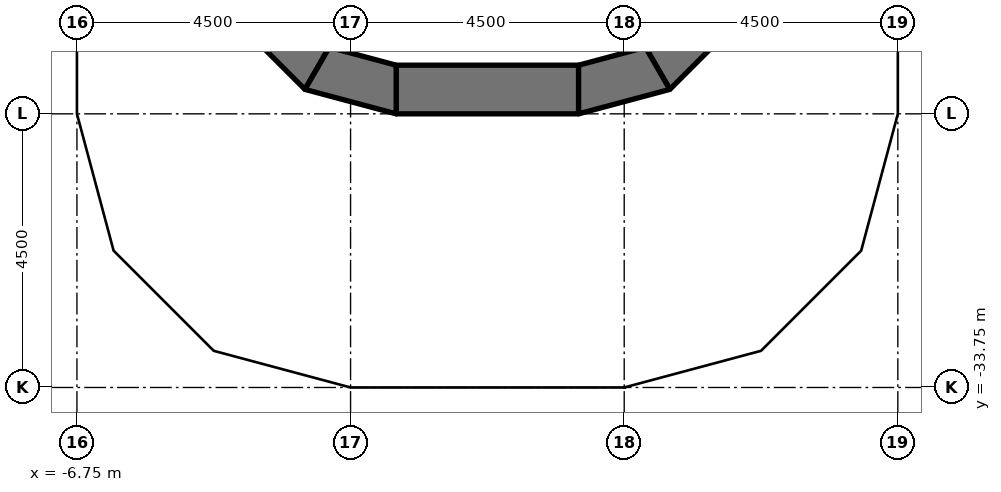
"""IFC4 building model, lengths in metres.
Left out: names, types, materials, properties, quantities, classifications, styles, units other than length and angle.
Written with IfcOpenShell. Run it as: python <this file> out.ifc"""

import sys

from ifc_helpers import new_model, si_unit, direction, frame, frame_2d, origin, origin_2d, place, context, subcontext, project, spatial, polyline, rectangle, outline, extrude, element, save


model = new_model("IFC4")
c1 = context("Model", 3, precision=1e-05, world=origin(), true_north=direction((0.0, 1.0)))
c2 = subcontext(c1, "Body", "Model", "MODEL_VIEW")
j1 = project(units=[si_unit("LENGTHUNIT", "METRE"), si_unit("PLANEANGLEUNIT", "RADIAN")], contexts=[c1])
p1 = place(None, origin())
s1 = spatial("IfcSite", under=j1, at=p1, CompositionType="ELEMENT")
p2 = place(p1, origin())
s2 = spatial("IfcBuilding", under=s1, at=p2, CompositionType="ELEMENT")
p3 = place(p2, frame((0.0, 0.0, 124.6)))
s3 = spatial("IfcBuildingStorey", under=s2, at=p3, CompositionType="ELEMENT", Elevation=124.6)
for number, where, z_axis, x_axis in (
    (1, (-2.25, -33.11, 0.0), (0.0, 0.0, 1.0), (1.0, 0.0, 0.0)),
    (2, (2.25, -33.11, 0.0), (0.0, 0.0, 1.0), (1.0, 0.0, 0.0)),
):
    element("IfcColumn", number, at=place(p3, frame(where, z_axis=z_axis, x_axis=x_axis)), inside=s3, PredefinedType="COLUMN", context=c2, shape_type="SweptSolid", body=[
        extrude(rectangle(XDim=0.9, YDim=0.9, at=origin_2d()), origin(), (0.0, 0.0, 1.0), 3.65),
    ])
p4 = place(p3, frame((-1.5, -28.85, 0.0), z_axis=(0.0, 0.0, 1.0), x_axis=(1.0, 0.0, 0.0)))
e3 = element("IfcWall", 3, at=p4, inside=s3, PredefinedType="SHEAR", context=c2, shape_type="SweptSolid", body=[
    extrude(rectangle(XDim=3.0, YDim=0.8, at=frame_2d((1.5, 0.0))), origin(), (0.0, 0.0, 1.0), 3.8),
])
p5 = place(p3, origin())
e4 = element("IfcWall", 4, at=p5, inside=s3, PredefinedType="SHEAR", context=c2, shape_type="SweptSolid", body=[
    extrude(outline(polyline([(-4.098, -27.75), (-3.0, -28.848), (-2.6, -28.155), (-3.405, -27.35), (-4.098, -27.75)])), origin(), (0.0, 0.0, 1.0), 3.8),
])
p6 = place(p3, origin())
e5 = element("IfcWall", 5, at=p6, inside=s3, PredefinedType="SHEAR", context=c2, shape_type="SweptSolid", body=[
    extrude(outline(polyline([(-3.0, -28.848), (-1.5, -29.25), (-1.5, -28.45), (-2.6, -28.155), (-3.0, -28.848)])), origin(), (0.0, 0.0, 1.0), 3.8),
])
p7 = place(p3, origin())
e6 = element("IfcWall", 6, at=p7, inside=s3, PredefinedType="SHEAR", context=c2, shape_type="SweptSolid", body=[
    extrude(outline(polyline([(4.098, -27.75), (3.0, -28.848), (2.6, -28.155), (3.405, -27.35), (4.098, -27.75)])), origin(), (0.0, 0.0, 1.0), 3.8),
])
p8 = place(p3, origin())
e7 = element("IfcWall", 7, at=p8, inside=s3, PredefinedType="SHEAR", context=c2, shape_type="SweptSolid", body=[
    extrude(outline(polyline([(3.0, -28.848), (1.5, -29.25), (1.5, -28.45), (2.6, -28.155), (3.0, -28.848)])), origin(), (0.0, 0.0, 1.0), 3.8),
])
save(model, sys.argv[1])
